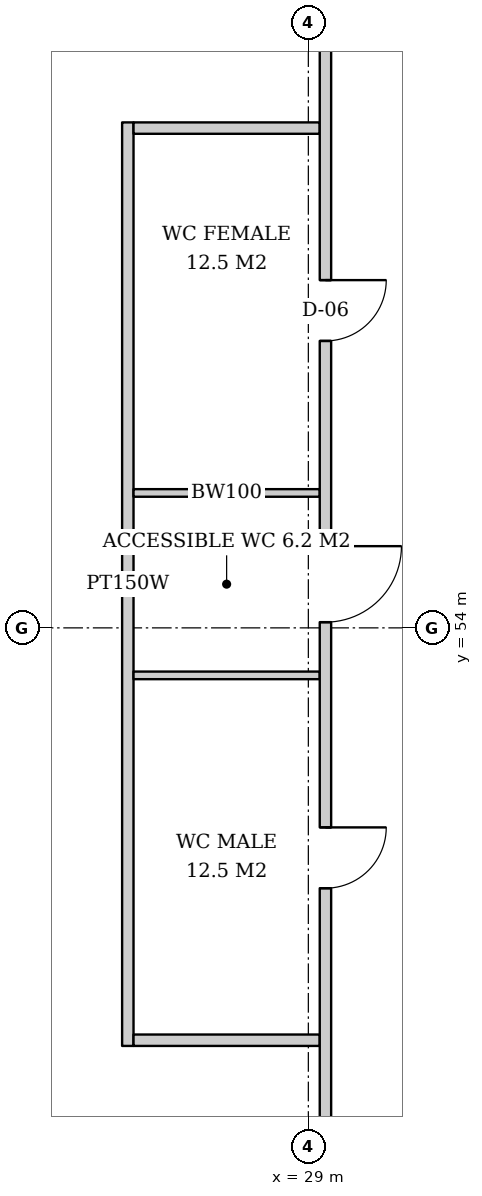
"""IFC4 building model, lengths in metres.
Left out: names, types, materials, properties, quantities, classifications, styles, units other than length and angle.
Written with IfcOpenShell. Run it as: python <this file> out.ifc"""

import sys

from ifc_helpers import new_model, si_unit, direction, frame, frame_2d, origin, place, context, subcontext, project, spatial, rectangle, extrude, element, fill, save


model = new_model("IFC4")
c1 = context("Model", 3, precision=1e-05, world=origin(), true_north=direction((0.0, 1.0)))
c2 = subcontext(c1, "Body", "Model", "MODEL_VIEW")
j1 = project(units=[si_unit("LENGTHUNIT", "METRE"), si_unit("PLANEANGLEUNIT", "RADIAN")], contexts=[c1])
p1 = place(None, origin())
s1 = spatial("IfcSite", under=j1, at=p1, CompositionType="ELEMENT")
p2 = place(p1, origin())
s2 = spatial("IfcBuilding", under=s1, at=p2, CompositionType="ELEMENT")
p3 = place(p2, frame((0.0, 0.0, 43.8)))
s3 = spatial("IfcBuildingStorey", under=s2, at=p3, CompositionType="ELEMENT", Elevation=43.8)
p4 = place(p3, frame((26.625, 60.65, 0.0), z_axis=(0.0, 0.0, 1.0), x_axis=(0.0, -1.0, 0.0)))
e1 = element("IfcWall", 1, at=p4, inside=s3, PredefinedType="PARTITIONING", context=c2, shape_type="SweptSolid", body=[
    extrude(rectangle(XDim=12.15, YDim=0.15, at=frame_2d((6.075, 0.0))), origin(), (0.0, 0.0, 1.0), 2.612),
])
p5 = place(p3, frame((29.15, 60.575, 0.0), z_axis=(0.0, 0.0, 1.0), x_axis=(-1.0, 0.0, 0.0)))
e2 = element("IfcWall", 2, at=p5, inside=s3, PredefinedType="PARTITIONING", context=c2, shape_type="SweptSolid", body=[
    extrude(rectangle(XDim=2.45, YDim=0.15, at=frame_2d((1.225, 0.0))), origin(), (0.0, 0.0, 1.0), 3.62),
])
for number, where, z_axis, x_axis in (
    (3, (29.15, 55.775, 0.0), (0.0, 0.0, 1.0), (-1.0, 0.0, 0.0)),
    (4, (29.15, 53.375, 0.0), (0.0, 0.0, 1.0), (-1.0, 0.0, 0.0)),
):
    element("IfcWall", number, at=place(p3, frame(where, z_axis=z_axis, x_axis=x_axis)), inside=s3, PredefinedType="SOLIDWALL", context=c2, shape_type="SweptSolid", body=[
        extrude(rectangle(XDim=2.45, YDim=0.1, at=frame_2d((1.225, 0.0))), origin(), (0.0, 0.0, 1.0), 3.62),
    ])
p6 = place(p3, frame((29.15, 48.575, 0.0), z_axis=(0.0, 0.0, 1.0), x_axis=(-1.0, 0.0, 0.0)))
e5 = element("IfcWall", 5, at=p6, inside=s3, PredefinedType="PARTITIONING", context=c2, shape_type="SweptSolid", body=[
    extrude(rectangle(XDim=2.45, YDim=0.15, at=frame_2d((1.225, 0.0))), origin(), (0.0, 0.0, 1.0), 3.62),
])
p7 = place(p3, frame((29.225, 61.85, 0.0), z_axis=(0.0, 0.0, 1.0), x_axis=(0.0, -1.0, 0.0)))
e6 = element("IfcWall", 6, at=p7, inside=s3, PredefinedType="PARTITIONING", context=c2, shape_type="SweptSolid", body=[
    extrude(rectangle(XDim=31.55, YDim=0.15, at=frame_2d((15.775, 0.0))), origin(), (0.0, 0.0, 1.0), 2.612),
])
p8 = place(p7, frame((3.275, 0.0, 0.0)))
e7 = element("IfcOpeningElement", 7, at=p8, cuts=e6, PredefinedType="OPENING", context=c2, shape_type="SweptSolid", body=[
    extrude(rectangle(XDim=0.8, YDim=2.1, at=frame_2d((0.4, 1.05))), frame((0.0, 0.085, 0.0), z_axis=(0.0, -1.0, 0.0), x_axis=(1.0, 0.0, 0.0)), (0.0, 0.0, 1.0), 0.17),
])
p9 = place(p7, frame((6.775, 0.0, 0.0)))
e8 = element("IfcOpeningElement", 8, at=p9, cuts=e6, PredefinedType="OPENING", context=c2, shape_type="SweptSolid", body=[
    extrude(rectangle(XDim=1.0, YDim=2.1, at=frame_2d((0.5, 1.05))), frame((0.0, 0.085, 0.0), z_axis=(0.0, -1.0, 0.0), x_axis=(1.0, 0.0, 0.0)), (0.0, 0.0, 1.0), 0.17),
])
p10 = place(p7, frame((10.475, 0.0, 0.0)))
e9 = element("IfcOpeningElement", 9, at=p10, cuts=e6, PredefinedType="OPENING", context=c2, shape_type="SweptSolid", body=[
    extrude(rectangle(XDim=0.8, YDim=2.1, at=frame_2d((0.4, 1.05))), frame((0.0, 0.085, 0.0), z_axis=(0.0, -1.0, 0.0), x_axis=(1.0, 0.0, 0.0)), (0.0, 0.0, 1.0), 0.17),
])
p11 = place(p8, origin())
e10 = element("IfcDoor", 10, at=p11, inside=s3, OperationType="SINGLE_SWING_LEFT", PredefinedType="DOOR", context=c2, shape_type="SweptSolid", body=[
    extrude(rectangle(XDim=0.8, YDim=2.1, at=frame_2d((0.4, 1.05))), frame((0.0, 0.025, 0.0), z_axis=(0.0, -1.0, 0.0), x_axis=(1.0, 0.0, 0.0)), (0.0, 0.0, 1.0), 0.05),
])
fill(e7, e10)
p12 = place(p9, origin())
e11 = element("IfcDoor", 11, at=p12, inside=s3, OperationType="SINGLE_SWING_LEFT", PredefinedType="DOOR", context=c2, shape_type="SweptSolid", body=[
    extrude(rectangle(XDim=1.0, YDim=2.1, at=frame_2d((0.5, 1.05))), frame((0.0, 0.025, 0.0), z_axis=(0.0, -1.0, 0.0), x_axis=(1.0, 0.0, 0.0)), (0.0, 0.0, 1.0), 0.05),
])
fill(e8, e11)
p13 = place(p10, origin())
e12 = element("IfcDoor", 12, at=p13, inside=s3, OperationType="SINGLE_SWING_LEFT", PredefinedType="DOOR", context=c2, shape_type="SweptSolid", body=[
    extrude(rectangle(XDim=0.8, YDim=2.1, at=frame_2d((0.4, 1.05))), frame((0.0, 0.025, 0.0), z_axis=(0.0, -1.0, 0.0), x_axis=(1.0, 0.0, 0.0)), (0.0, 0.0, 1.0), 0.05),
])
fill(e9, e12)
save(model, sys.argv[1])
